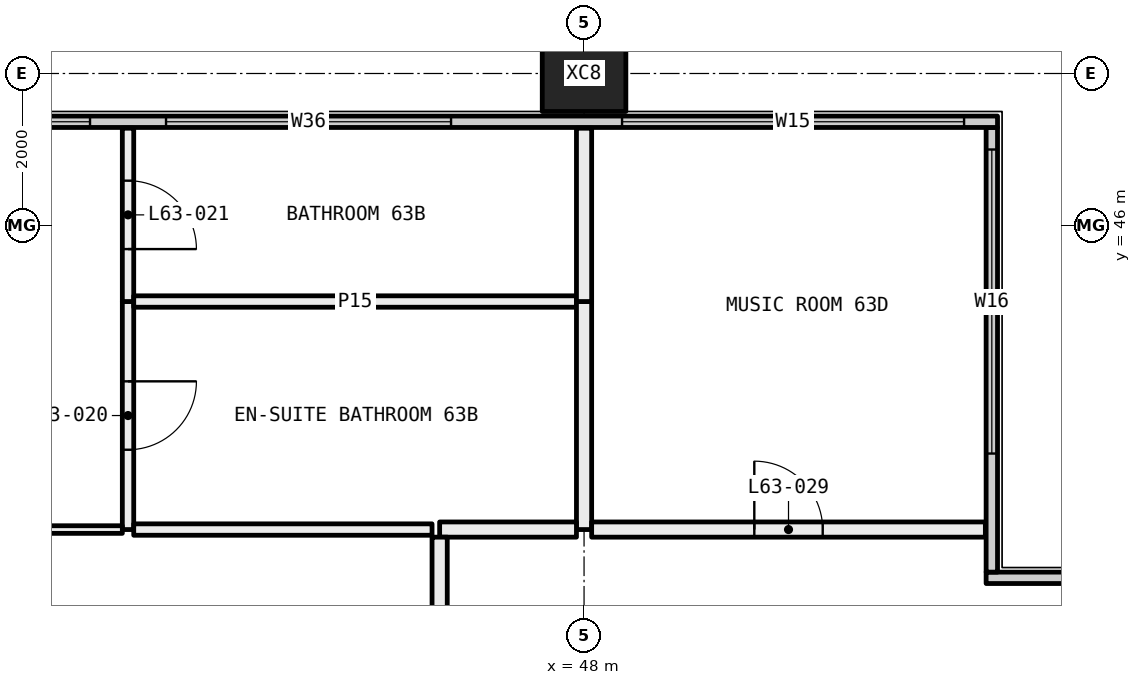
"""IFC4 building model, lengths in metres.
Left out: names, types, materials, properties, quantities, classifications, styles, units other than length and angle.
Written with IfcOpenShell. Run it as: python <this file> out.ifc"""

import sys

from ifc_helpers import new_model, si_unit, direction, frame, frame_2d, origin, origin_2d, place, context, subcontext, project, spatial, rectangle, hollow_rectangle, extrude, element, fill, save


model = new_model("IFC4")
c1 = context("Model", 3, precision=1e-05, world=origin(), true_north=direction((0.0, 1.0)))
c2 = subcontext(c1, "Body", "Model", "MODEL_VIEW")
j1 = project(units=[si_unit("LENGTHUNIT", "METRE"), si_unit("PLANEANGLEUNIT", "RADIAN")], contexts=[c1])
p1 = place(None, origin())
s1 = spatial("IfcSite", under=j1, at=p1, CompositionType="ELEMENT")
p2 = place(p1, origin())
s2 = spatial("IfcBuilding", under=s1, at=p2, CompositionType="ELEMENT")
p3 = place(p2, frame((0.0, 0.0, 235.2)))
s3 = spatial("IfcBuildingStorey", under=s2, at=p3, CompositionType="ELEMENT", Elevation=235.2)
p4 = place(p3, frame((48.0, 48.0, -0.4), z_axis=(0.0, 0.0, 1.0), x_axis=(1.0, 0.0, 0.0)))
e1 = element("IfcColumn", 1, at=p4, inside=s3, PredefinedType="COLUMN", context=c2, shape_type="SweptSolid", body=[
    extrude(hollow_rectangle(XDim=1.1, YDim=1.0, WallThickness=0.04, at=origin_2d()), origin(), (0.0, 0.0, 1.0), 3.45),
])
p5 = place(p3, frame((53.29, 41.365, 0.0), z_axis=(0.0, 0.0, 1.0), x_axis=(1.0, 0.0, 0.0)))
e2 = element("IfcWall", 2, at=p5, inside=s3, PredefinedType="ELEMENTEDWALL", context=c2, shape_type="SweptSolid", body=[
    extrude(rectangle(XDim=6.15, YDim=0.15, at=frame_2d((3.075, 0.0))), origin(), (0.0, 0.0, 1.0), 3.05),
])
p6 = place(p5, frame((1.71, 0.0, 0.45)))
e3 = element("IfcOpeningElement", 3, at=p6, cuts=e2, PredefinedType="OPENING", context=c2, shape_type="SweptSolid", body=[
    extrude(rectangle(XDim=4.0, YDim=2.55, at=frame_2d((2.0, 1.275))), frame((0.0, 0.085, 0.0), z_axis=(0.0, -1.0, 0.0), x_axis=(1.0, 0.0, 0.0)), (0.0, 0.0, 1.0), 0.17),
])
p7 = place(p3, frame((53.365, 41.44, 0.0), z_axis=(0.0, 0.0, 1.0), x_axis=(0.0, 1.0, 0.0)))
e4 = element("IfcWall", 4, at=p7, inside=s3, PredefinedType="ELEMENTEDWALL", context=c2, shape_type="SweptSolid", body=[
    extrude(rectangle(XDim=5.85, YDim=0.15, at=frame_2d((2.925, 0.0))), origin(), (0.0, 0.0, 1.0), 3.05),
])
p8 = place(p7, frame((1.56, 0.0, 0.45)))
e5 = element("IfcOpeningElement", 5, at=p8, cuts=e4, PredefinedType="OPENING", context=c2, shape_type="SweptSolid", body=[
    extrude(rectangle(XDim=4.0, YDim=2.55, at=frame_2d((2.0, 1.275))), frame((0.0, 0.085, 0.0), z_axis=(0.0, -1.0, 0.0), x_axis=(1.0, 0.0, 0.0)), (0.0, 0.0, 1.0), 0.17),
])
p9 = place(p3, frame((18.56, 47.365, 0.0), z_axis=(0.0, 0.0, 1.0), x_axis=(1.0, 0.0, 0.0)))
e6 = element("IfcWall", 6, at=p9, inside=s3, PredefinedType="ELEMENTEDWALL", context=c2, shape_type="SweptSolid", body=[
    extrude(rectangle(XDim=34.88, YDim=0.15, at=frame_2d((17.44, 0.0))), origin(), (0.0, 0.0, 1.0), 3.05),
])
p10 = place(p9, frame((0.44, 0.0, 0.45)))
e7 = element("IfcOpeningElement", 7, at=p10, cuts=e6, PredefinedType="OPENING", context=c2, shape_type="SweptSolid", body=[
    extrude(rectangle(XDim=4.5, YDim=2.55, at=frame_2d((2.25, 1.275))), frame((0.0, 0.085, 0.0), z_axis=(0.0, -1.0, 0.0), x_axis=(1.0, 0.0, 0.0)), (0.0, 0.0, 1.0), 0.17),
])
p11 = place(p9, frame((7.19, 0.0, 0.45)))
e8 = element("IfcOpeningElement", 8, at=p11, cuts=e6, PredefinedType="OPENING", context=c2, shape_type="SweptSolid", body=[
    extrude(rectangle(XDim=3.75, YDim=2.55, at=frame_2d((1.875, 1.275))), frame((0.0, 0.085, 0.0), z_axis=(0.0, -1.0, 0.0), x_axis=(1.0, 0.0, 0.0)), (0.0, 0.0, 1.0), 0.17),
])
p12 = place(p9, frame((11.94, 0.0, 0.45)))
e9 = element("IfcOpeningElement", 9, at=p12, cuts=e6, PredefinedType="OPENING", context=c2, shape_type="SweptSolid", body=[
    extrude(rectangle(XDim=2.0, YDim=2.55, at=frame_2d((1.0, 1.275))), frame((0.0, 0.085, 0.0), z_axis=(0.0, -1.0, 0.0), x_axis=(1.0, 0.0, 0.0)), (0.0, 0.0, 1.0), 0.17),
])
p13 = place(p9, frame((14.94, 0.0, 0.45)))
e10 = element("IfcOpeningElement", 10, at=p13, cuts=e6, PredefinedType="OPENING", context=c2, shape_type="SweptSolid", body=[
    extrude(rectangle(XDim=0.75, YDim=2.55, at=frame_2d((0.375, 1.275))), frame((0.0, 0.085, 0.0), z_axis=(0.0, -1.0, 0.0), x_axis=(1.0, 0.0, 0.0)), (0.0, 0.0, 1.0), 0.17),
])
p14 = place(p9, frame((19.19, 0.0, 0.45)))
e11 = element("IfcOpeningElement", 11, at=p14, cuts=e6, PredefinedType="OPENING", context=c2, shape_type="SweptSolid", body=[
    extrude(rectangle(XDim=3.75, YDim=2.55, at=frame_2d((1.875, 1.275))), frame((0.0, 0.085, 0.0), z_axis=(0.0, -1.0, 0.0), x_axis=(1.0, 0.0, 0.0)), (0.0, 0.0, 1.0), 0.17),
])
p15 = place(p9, frame((23.94, 0.0, 0.45)))
e12 = element("IfcOpeningElement", 12, at=p15, cuts=e6, PredefinedType="OPENING", context=c2, shape_type="SweptSolid", body=[
    extrude(rectangle(XDim=3.75, YDim=2.55, at=frame_2d((1.875, 1.275))), frame((0.0, 0.085, 0.0), z_axis=(0.0, -1.0, 0.0), x_axis=(1.0, 0.0, 0.0)), (0.0, 0.0, 1.0), 0.17),
])
p16 = place(p9, frame((29.94, 0.0, 0.45)))
e13 = element("IfcOpeningElement", 13, at=p16, cuts=e6, PredefinedType="OPENING", context=c2, shape_type="SweptSolid", body=[
    extrude(rectangle(XDim=4.5, YDim=2.55, at=frame_2d((2.25, 1.275))), frame((0.0, 0.085, 0.0), z_axis=(0.0, -1.0, 0.0), x_axis=(1.0, 0.0, 0.0)), (0.0, 0.0, 1.0), 0.17),
])
p17 = place(p3, frame((42.0, 42.0, 0.0), z_axis=(0.0, 0.0, 1.0), x_axis=(0.0, 1.0, 0.0)))
e14 = element("IfcWall", 14, at=p17, inside=s3, PredefinedType="PARTITIONING", context=c2, shape_type="SweptSolid", body=[
    extrude(rectangle(XDim=3.0, YDim=0.15, at=frame_2d((1.5, 0.0))), origin(), (0.0, 0.0, 1.0), 3.05),
])
p18 = place(p17, frame((1.05, 0.0, 0.0)))
e15 = element("IfcOpeningElement", 15, at=p18, cuts=e14, PredefinedType="OPENING", context=c2, shape_type="SweptSolid", body=[
    extrude(rectangle(XDim=0.9, YDim=2.1, at=frame_2d((0.45, 1.05))), frame((0.0, 0.085, 0.0), z_axis=(0.0, -1.0, 0.0), x_axis=(1.0, 0.0, 0.0)), (0.0, 0.0, 1.0), 0.17),
])
p19 = place(p3, frame((42.0, 45.0, 0.0), z_axis=(0.0, 0.0, 1.0), x_axis=(0.0, 1.0, 0.0)))
e16 = element("IfcWall", 16, at=p19, inside=s3, PredefinedType="PARTITIONING", context=c2, shape_type="SweptSolid", body=[
    extrude(rectangle(XDim=2.28, YDim=0.15, at=frame_2d((1.14, 0.0))), origin(), (0.0, 0.0, 1.0), 3.05),
])
p20 = place(p19, frame((0.69, 0.0, 0.0)))
e17 = element("IfcOpeningElement", 17, at=p20, cuts=e16, PredefinedType="OPENING", context=c2, shape_type="SweptSolid", body=[
    extrude(rectangle(XDim=0.9, YDim=2.1, at=frame_2d((0.45, 1.05))), frame((0.0, 0.085, 0.0), z_axis=(0.0, -1.0, 0.0), x_axis=(1.0, 0.0, 0.0)), (0.0, 0.0, 1.0), 0.17),
])
p21 = place(p3, frame((40.5, 42.0, 0.0), z_axis=(0.0, 0.0, 1.0), x_axis=(1.0, 0.0, 0.0)))
e18 = element("IfcWall", 18, at=p21, inside=s3, PredefinedType="PARTITIONING", context=c2, shape_type="SweptSolid", body=[
    extrude(rectangle(XDim=1.425, YDim=0.1, at=frame_2d((0.712, 0.0))), origin(), (0.0, 0.0, 1.0), 3.05),
])
p22 = place(p3, frame((47.9, 45.0, 0.0), z_axis=(0.0, 0.0, 1.0), x_axis=(-1.0, 0.0, 0.0)))
e19 = element("IfcWall", 19, at=p22, inside=s3, PredefinedType="PARTITIONING", context=c2, shape_type="SweptSolid", body=[
    extrude(rectangle(XDim=5.825, YDim=0.15, at=frame_2d((2.913, 0.0))), origin(), (0.0, 0.0, 1.0), 3.05),
])
p23 = place(p3, frame((42.075, 42.0, 0.0), z_axis=(0.0, 0.0, 1.0), x_axis=(1.0, 0.0, 0.0)))
e20 = element("IfcWall", 20, at=p23, inside=s3, PredefinedType="PARTITIONING", context=c2, shape_type="SweptSolid", body=[
    extrude(rectangle(XDim=3.925, YDim=0.15, at=frame_2d((1.962, 0.0))), origin(), (0.0, 0.0, 1.0), 3.05),
])
p24 = place(p3, frame((48.0, 42.0, 0.0), z_axis=(0.0, 0.0, 1.0), x_axis=(0.0, 1.0, 0.0)))
e21 = element("IfcWall", 21, at=p24, inside=s3, PredefinedType="PARTITIONING", context=c2, shape_type="SweptSolid", body=[
    extrude(rectangle(XDim=3.0, YDim=0.2, at=frame_2d((1.5, 0.0))), origin(), (0.0, 0.0, 1.0), 3.05),
])
p25 = place(p3, frame((46.1, 42.0, 0.0), z_axis=(0.0, 0.0, 1.0), x_axis=(1.0, 0.0, 0.0)))
e22 = element("IfcWall", 22, at=p25, inside=s3, PredefinedType="PARTITIONING", context=c2, shape_type="SweptSolid", body=[
    extrude(rectangle(XDim=1.8, YDim=0.2, at=frame_2d((0.9, 0.0))), origin(), (0.0, 0.0, 1.0), 3.05),
])
p26 = place(p3, frame((48.0, 45.0, 0.0), z_axis=(0.0, 0.0, 1.0), x_axis=(0.0, 1.0, 0.0)))
e23 = element("IfcWall", 23, at=p26, inside=s3, PredefinedType="PARTITIONING", context=c2, shape_type="SweptSolid", body=[
    extrude(rectangle(XDim=2.28, YDim=0.2, at=frame_2d((1.14, 0.0))), origin(), (0.0, 0.0, 1.0), 3.05),
])
p27 = place(p3, frame((46.1, 36.1, 0.0), z_axis=(0.0, 0.0, 1.0), x_axis=(0.0, 1.0, 0.0)))
e24 = element("IfcWall", 24, at=p27, inside=s3, PredefinedType="PARTITIONING", context=c2, shape_type="SweptSolid", body=[
    extrude(rectangle(XDim=5.8, YDim=0.2, at=frame_2d((2.9, 0.0))), origin(), (0.0, 0.0, 1.0), 3.05),
])
p28 = place(p3, frame((48.1, 42.0, 0.0), z_axis=(0.0, 0.0, 1.0), x_axis=(1.0, 0.0, 0.0)))
e25 = element("IfcWall", 25, at=p28, inside=s3, PredefinedType="PARTITIONING", context=c2, shape_type="SweptSolid", body=[
    extrude(rectangle(XDim=5.18, YDim=0.2, at=frame_2d((2.59, 0.0))), origin(), (0.0, 0.0, 1.0), 3.05),
])
p29 = place(p28, frame((2.14, 0.0, 0.0)))
e26 = element("IfcOpeningElement", 26, at=p29, cuts=e25, PredefinedType="OPENING", context=c2, shape_type="SweptSolid", body=[
    extrude(rectangle(XDim=0.9, YDim=2.1, at=frame_2d((0.45, 1.05))), frame((0.0, 0.11, 0.0), z_axis=(0.0, -1.0, 0.0), x_axis=(1.0, 0.0, 0.0)), (0.0, 0.0, 1.0), 0.22),
])
p30 = place(p8, origin())
e27 = element("IfcWindow", 27, at=p30, inside=s3, PartitioningType="SINGLE_PANEL", PredefinedType="WINDOW", context=c2, shape_type="SweptSolid", body=[
    extrude(rectangle(XDim=4.0, YDim=2.55, at=frame_2d((2.0, 1.275))), frame((0.0, 0.03, 0.0), z_axis=(0.0, -1.0, 0.0), x_axis=(1.0, 0.0, 0.0)), (0.0, 0.0, 1.0), 0.06),
])
fill(e5, e27)
p31 = place(p14, origin())
e28 = element("IfcWindow", 28, at=p31, inside=s3, PartitioningType="SINGLE_PANEL", PredefinedType="WINDOW", context=c2, shape_type="SweptSolid", body=[
    extrude(rectangle(XDim=3.75, YDim=2.55, at=frame_2d((1.875, 1.275))), frame((0.0, 0.03, 0.0), z_axis=(0.0, -1.0, 0.0), x_axis=(1.0, 0.0, 0.0)), (0.0, 0.0, 1.0), 0.06),
])
fill(e11, e28)
p32 = place(p15, origin())
e29 = element("IfcWindow", 29, at=p32, inside=s3, PartitioningType="SINGLE_PANEL", PredefinedType="WINDOW", context=c2, shape_type="SweptSolid", body=[
    extrude(rectangle(XDim=3.75, YDim=2.55, at=frame_2d((1.875, 1.275))), frame((0.0, 0.03, 0.0), z_axis=(0.0, -1.0, 0.0), x_axis=(1.0, 0.0, 0.0)), (0.0, 0.0, 1.0), 0.06),
])
fill(e12, e29)
p33 = place(p16, origin())
e30 = element("IfcWindow", 30, at=p33, inside=s3, PartitioningType="SINGLE_PANEL", PredefinedType="WINDOW", context=c2, shape_type="SweptSolid", body=[
    extrude(rectangle(XDim=4.5, YDim=2.55, at=frame_2d((2.25, 1.275))), frame((0.0, 0.03, 0.0), z_axis=(0.0, -1.0, 0.0), x_axis=(1.0, 0.0, 0.0)), (0.0, 0.0, 1.0), 0.06),
])
fill(e13, e30)
p34 = place(p18, frame((0.9, 0.0, 0.0), x_axis=(-1.0, 0.0, 0.0)))
e31 = element("IfcDoor", 31, at=p34, inside=s3, OperationType="SINGLE_SWING_RIGHT", PredefinedType="DOOR", context=c2, shape_type="SweptSolid", body=[
    extrude(rectangle(XDim=0.9, YDim=2.1, at=frame_2d((0.45, 1.05))), frame((0.0, 0.025, 0.0), z_axis=(0.0, -1.0, 0.0), x_axis=(1.0, 0.0, 0.0)), (0.0, 0.0, 1.0), 0.05),
])
fill(e15, e31)
p35 = place(p20, frame((0.9, 0.0, 0.0), x_axis=(-1.0, 0.0, 0.0)))
e32 = element("IfcDoor", 32, at=p35, inside=s3, OperationType="SINGLE_SWING_LEFT", PredefinedType="DOOR", context=c2, shape_type="SweptSolid", body=[
    extrude(rectangle(XDim=0.9, YDim=2.1, at=frame_2d((0.45, 1.05))), frame((0.0, 0.025, 0.0), z_axis=(0.0, -1.0, 0.0), x_axis=(1.0, 0.0, 0.0)), (0.0, 0.0, 1.0), 0.05),
])
fill(e17, e32)
p36 = place(p29, origin())
e33 = element("IfcDoor", 33, at=p36, inside=s3, OperationType="SINGLE_SWING_RIGHT", PredefinedType="DOOR", context=c2, shape_type="SweptSolid", body=[
    extrude(rectangle(XDim=0.9, YDim=2.1, at=frame_2d((0.45, 1.05))), frame((0.0, 0.025, 0.0), z_axis=(0.0, -1.0, 0.0), x_axis=(1.0, 0.0, 0.0)), (0.0, 0.0, 1.0), 0.05),
])
fill(e26, e33)
save(model, sys.argv[1])
